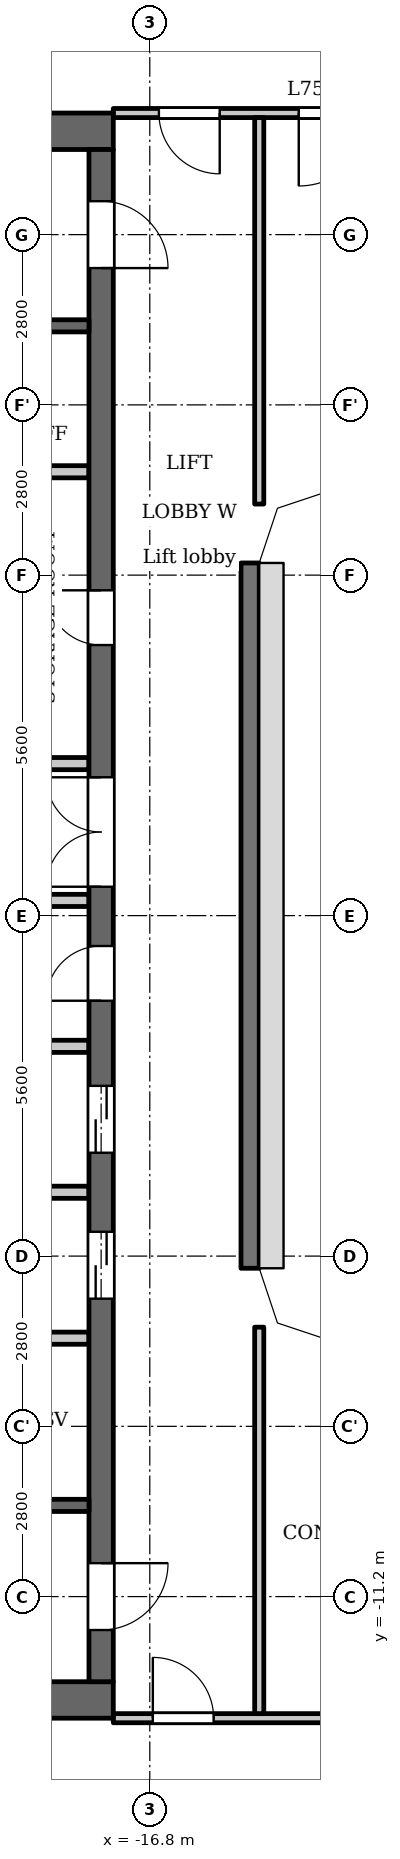
"""IFC4 building model, lengths in metres.
Left out: names, types, materials, properties, quantities, classifications, styles, units other than length and angle.
Written with IfcOpenShell. Run it as: python <this file> out.ifc"""

import sys

from ifc_helpers import new_model, si_unit, direction, frame, frame_2d, origin, place, context, subcontext, project, spatial, polyline, rectangle, outline, extrude, element, fill, save


model = new_model("IFC4")
c1 = context("Model", 3, precision=1e-05, world=origin(), true_north=direction((0.0, 1.0)))
c2 = subcontext(c1, "Body", "Model", "MODEL_VIEW")
j1 = project(units=[si_unit("LENGTHUNIT", "METRE"), si_unit("PLANEANGLEUNIT", "RADIAN")], contexts=[c1])
p1 = place(None, origin())
s1 = spatial("IfcSite", under=j1, at=p1, CompositionType="ELEMENT")
p2 = place(p1, origin())
s2 = spatial("IfcBuilding", under=s1, at=p2, CompositionType="ELEMENT")
p3 = place(p2, frame((0.0, 0.0, 289.1)))
s3 = spatial("IfcBuildingStorey", under=s2, at=p3, CompositionType="ELEMENT", Elevation=289.1)
p4 = place(p3, frame((-15.15, -5.8, 0.0), z_axis=(0.0, 0.0, 1.0), x_axis=(0.0, 1.0, 0.0)))
e1 = element("IfcWall", 1, at=p4, inside=s3, PredefinedType="SOLIDWALL", context=c2, shape_type="SweptSolid", body=[
    extrude(rectangle(XDim=11.6, YDim=0.3, at=frame_2d((5.8, 0.0))), origin(), (0.0, 0.0, 1.0), 5.0),
])
for number, where, z_axis, x_axis in (
    (2, (-17.4, 12.9, 0.0), (0.0, 0.0, 1.0), (-1.0, 0.0, 0.0)),
    (3, (-17.4, -12.9, 0.0), (0.0, 0.0, 1.0), (-1.0, 0.0, 0.0)),
):
    element("IfcWall", number, at=place(p3, frame(where, z_axis=z_axis, x_axis=x_axis)), inside=s3, PredefinedType="SHEAR", context=c2, shape_type="SweptSolid", body=[
        extrude(rectangle(XDim=7.32, YDim=0.6, at=frame_2d((3.66, 0.0))), origin(), (0.0, 0.0, 1.0), 5.0),
    ])
p5 = place(p3, frame((-17.6, -12.6, 0.0), z_axis=(0.0, 0.0, 1.0), x_axis=(0.0, 1.0, 0.0)))
e4 = element("IfcWall", 4, at=p5, inside=s3, PredefinedType="SHEAR", context=c2, shape_type="SweptSolid", body=[
    extrude(rectangle(XDim=25.2, YDim=0.4, at=frame_2d((12.6, 0.0))), origin(), (0.0, 0.0, 1.0), 5.0),
])
p6 = place(p5, frame((6.3, 0.0, 0.0)))
e5 = element("IfcOpeningElement", 5, at=p6, cuts=e4, PredefinedType="OPENING", context=c2, shape_type="SweptSolid", body=[
    extrude(rectangle(XDim=1.1, YDim=2.1, at=frame_2d((0.55, 1.05))), frame((0.0, 0.21, 0.0), z_axis=(0.0, -1.0, 0.0), x_axis=(1.0, 0.0, 0.0)), (0.0, 0.0, 1.0), 0.42),
])
p7 = place(p5, frame((8.7, 0.0, 0.0)))
e6 = element("IfcOpeningElement", 6, at=p7, cuts=e4, PredefinedType="OPENING", context=c2, shape_type="SweptSolid", body=[
    extrude(rectangle(XDim=1.1, YDim=2.1, at=frame_2d((0.55, 1.05))), frame((0.0, 0.21, 0.0), z_axis=(0.0, -1.0, 0.0), x_axis=(1.0, 0.0, 0.0)), (0.0, 0.0, 1.0), 0.42),
])
p8 = place(p5, frame((11.2, 0.0, 0.0)))
e7 = element("IfcOpeningElement", 7, at=p8, cuts=e4, PredefinedType="OPENING", context=c2, shape_type="SweptSolid", body=[
    extrude(rectangle(XDim=0.9, YDim=2.1, at=frame_2d((0.45, 1.05))), frame((0.0, 0.21, 0.0), z_axis=(0.0, -1.0, 0.0), x_axis=(1.0, 0.0, 0.0)), (0.0, 0.0, 1.0), 0.42),
])
p9 = place(p5, frame((17.05, 0.0, 0.0)))
e8 = element("IfcOpeningElement", 8, at=p9, cuts=e4, PredefinedType="OPENING", context=c2, shape_type="SweptSolid", body=[
    extrude(rectangle(XDim=0.9, YDim=2.1, at=frame_2d((0.45, 1.05))), frame((0.0, 0.21, 0.0), z_axis=(0.0, -1.0, 0.0), x_axis=(1.0, 0.0, 0.0)), (0.0, 0.0, 1.0), 0.42),
])
p10 = place(p5, frame((23.25, 0.0, 0.0)))
e9 = element("IfcOpeningElement", 9, at=p10, cuts=e4, PredefinedType="OPENING", context=c2, shape_type="SweptSolid", body=[
    extrude(rectangle(XDim=1.1, YDim=2.1, at=frame_2d((0.55, 1.05))), frame((0.0, 0.21, 0.0), z_axis=(0.0, -1.0, 0.0), x_axis=(1.0, 0.0, 0.0)), (0.0, 0.0, 1.0), 0.42),
])
p11 = place(p5, frame((0.85, 0.0, 0.0)))
e10 = element("IfcOpeningElement", 10, at=p11, cuts=e4, PredefinedType="OPENING", context=c2, shape_type="SweptSolid", body=[
    extrude(rectangle(XDim=1.1, YDim=2.1, at=frame_2d((0.55, 1.05))), frame((0.0, 0.21, 0.0), z_axis=(0.0, -1.0, 0.0), x_axis=(1.0, 0.0, 0.0)), (0.0, 0.0, 1.0), 0.42),
])
p12 = place(p5, frame((13.075, 0.0, 0.0)))
e11 = element("IfcOpeningElement", 11, at=p12, cuts=e4, PredefinedType="OPENING", context=c2, shape_type="SweptSolid", body=[
    extrude(rectangle(XDim=1.8, YDim=2.1, at=frame_2d((0.9, 1.05))), frame((0.0, 0.21, 0.0), z_axis=(0.0, -1.0, 0.0), x_axis=(1.0, 0.0, 0.0)), (0.0, 0.0, 1.0), 0.42),
])
p13 = place(p3, frame((-17.8, -9.7, 0.0), z_axis=(0.0, 0.0, 1.0), x_axis=(-1.0, 0.0, 0.0)))
e12 = element("IfcWall", 12, at=p13, inside=s3, PredefinedType="SHEAR", context=c2, shape_type="SweptSolid", body=[
    extrude(rectangle(XDim=5.8, YDim=0.2, at=frame_2d((2.9, 0.0))), origin(), (0.0, 0.0, 1.0), 5.0),
])
p14 = place(p13, frame((0.85, 0.0, 0.0)))
e13 = element("IfcOpeningElement", 13, at=p14, cuts=e12, PredefinedType="OPENING", context=c2, shape_type="SweptSolid", body=[
    extrude(rectangle(XDim=1.1, YDim=2.1, at=frame_2d((0.55, 1.05))), frame((0.0, 0.11, 0.0), z_axis=(0.0, -1.0, 0.0), x_axis=(1.0, 0.0, 0.0)), (0.0, 0.0, 1.0), 0.22),
])
p15 = place(p13, frame((3.75, 0.0, 0.0)))
e14 = element("IfcOpeningElement", 14, at=p15, cuts=e12, PredefinedType="OPENING", context=c2, shape_type="SweptSolid", body=[
    extrude(rectangle(XDim=1.1, YDim=2.1, at=frame_2d((0.55, 1.05))), frame((0.0, 0.11, 0.0), z_axis=(0.0, -1.0, 0.0), x_axis=(1.0, 0.0, 0.0)), (0.0, 0.0, 1.0), 0.22),
])
for number, where, z_axis, x_axis in (
    (15, (-17.8, -6.95, 0.0), (0.0, 0.0, 1.0), (-1.0, 0.0, 0.0)),
    (16, (-17.8, -4.55, 0.0), (0.0, 0.0, 1.0), (-1.0, 0.0, 0.0)),
    (17, (-17.8, -2.15, 0.0), (0.0, 0.0, 1.0), (-1.0, 0.0, 0.0)),
):
    element("IfcWall", number, at=place(p3, frame(where, z_axis=z_axis, x_axis=x_axis)), inside=s3, PredefinedType="PARTITIONING", context=c2, shape_type="SweptSolid", body=[
        extrude(rectangle(XDim=2.8, YDim=0.2, at=frame_2d((1.4, 0.0))), origin(), (0.0, 0.0, 1.0), 5.0),
    ])
p16 = place(p3, frame((-17.8, 0.25, 0.0), z_axis=(0.0, 0.0, 1.0), x_axis=(-1.0, 0.0, 0.0)))
e18 = element("IfcWall", 18, at=p16, inside=s3, PredefinedType="PARTITIONING", context=c2, shape_type="SweptSolid", body=[
    extrude(rectangle(XDim=3.0, YDim=0.2, at=frame_2d((1.5, 0.0))), origin(), (0.0, 0.0, 1.0), 5.0),
])
p17 = place(p3, frame((-17.8, 2.5, 0.0), z_axis=(0.0, 0.0, 1.0), x_axis=(-1.0, 0.0, 0.0)))
e19 = element("IfcWall", 19, at=p17, inside=s3, PredefinedType="PARTITIONING", context=c2, shape_type="SweptSolid", body=[
    extrude(rectangle(XDim=3.0, YDim=0.2, at=frame_2d((1.5, 0.0))), origin(), (0.0, 0.0, 1.0), 5.0),
])
p18 = place(p17, frame((1.7, 0.0, 0.0)))
e20 = element("IfcOpeningElement", 20, at=p18, cuts=e19, PredefinedType="OPENING", context=c2, shape_type="SweptSolid", body=[
    extrude(rectangle(XDim=0.9, YDim=2.1, at=frame_2d((0.45, 1.05))), frame((0.0, 0.11, 0.0), z_axis=(0.0, -1.0, 0.0), x_axis=(1.0, 0.0, 0.0)), (0.0, 0.0, 1.0), 0.22),
])
p19 = place(p3, frame((-17.8, 7.3, 0.0), z_axis=(0.0, 0.0, 1.0), x_axis=(-1.0, 0.0, 0.0)))
e21 = element("IfcWall", 21, at=p19, inside=s3, PredefinedType="PARTITIONING", context=c2, shape_type="SweptSolid", body=[
    extrude(rectangle(XDim=2.8, YDim=0.2, at=frame_2d((1.4, 0.0))), origin(), (0.0, 0.0, 1.0), 5.0),
])
p20 = place(p3, frame((-17.8, 9.7, 0.0), z_axis=(0.0, 0.0, 1.0), x_axis=(-1.0, 0.0, 0.0)))
e22 = element("IfcWall", 22, at=p20, inside=s3, PredefinedType="SHEAR", context=c2, shape_type="SweptSolid", body=[
    extrude(rectangle(XDim=5.8, YDim=0.2, at=frame_2d((2.9, 0.0))), origin(), (0.0, 0.0, 1.0), 5.0),
])
p21 = place(p20, frame((0.85, 0.0, 0.0)))
e23 = element("IfcOpeningElement", 23, at=p21, cuts=e22, PredefinedType="OPENING", context=c2, shape_type="SweptSolid", body=[
    extrude(rectangle(XDim=1.1, YDim=2.1, at=frame_2d((0.55, 1.05))), frame((0.0, 0.11, 0.0), z_axis=(0.0, -1.0, 0.0), x_axis=(1.0, 0.0, 0.0)), (0.0, 0.0, 1.0), 0.22),
])
p22 = place(p20, frame((3.75, 0.0, 0.0)))
e24 = element("IfcOpeningElement", 24, at=p22, cuts=e22, PredefinedType="OPENING", context=c2, shape_type="SweptSolid", body=[
    extrude(rectangle(XDim=1.1, YDim=2.1, at=frame_2d((0.55, 1.05))), frame((0.0, 0.11, 0.0), z_axis=(0.0, -1.0, 0.0), x_axis=(1.0, 0.0, 0.0)), (0.0, 0.0, 1.0), 0.22),
])
p23 = place(p3, frame((-17.4, -13.2, 0.0), z_axis=(0.0, 0.0, 1.0), x_axis=(1.0, 0.0, 0.0)))
e25 = element("IfcWall", 25, at=p23, inside=s3, PredefinedType="PARTITIONING", context=c2, shape_type="SweptSolid", body=[
    extrude(rectangle(XDim=34.8, YDim=0.15, at=frame_2d((17.4, 0.0))), origin(), (0.0, 0.0, 1.0), 5.0),
])
p24 = place(p23, frame((0.65, 0.0, 0.0)))
e26 = element("IfcOpeningElement", 26, at=p24, cuts=e25, PredefinedType="OPENING", context=c2, shape_type="SweptSolid", body=[
    extrude(rectangle(XDim=1.0, YDim=2.1, at=frame_2d((0.5, 1.05))), frame((0.0, 0.085, 0.0), z_axis=(0.0, -1.0, 0.0), x_axis=(1.0, 0.0, 0.0)), (0.0, 0.0, 1.0), 0.17),
])
p25 = place(p23, frame((33.05, 0.0, 0.0)))
e27 = element("IfcOpeningElement", 27, at=p25, cuts=e25, PredefinedType="OPENING", context=c2, shape_type="SweptSolid", body=[
    extrude(rectangle(XDim=1.0, YDim=2.1, at=frame_2d((0.5, 1.05))), frame((0.0, 0.085, 0.0), z_axis=(0.0, -1.0, 0.0), x_axis=(1.0, 0.0, 0.0)), (0.0, 0.0, 1.0), 0.17),
])
p26 = place(p23, frame((6.75, 0.0, 0.0)))
e28 = element("IfcOpeningElement", 28, at=p26, cuts=e25, PredefinedType="OPENING", context=c2, shape_type="SweptSolid", body=[
    extrude(rectangle(XDim=1.0, YDim=2.1, at=frame_2d((0.5, 1.05))), frame((0.0, 0.085, 0.0), z_axis=(0.0, -1.0, 0.0), x_axis=(1.0, 0.0, 0.0)), (0.0, 0.0, 1.0), 0.17),
])
p27 = place(p23, frame((9.0, 0.0, 0.0)))
e29 = element("IfcOpeningElement", 29, at=p27, cuts=e25, PredefinedType="OPENING", context=c2, shape_type="SweptSolid", body=[
    extrude(rectangle(XDim=1.0, YDim=2.1, at=frame_2d((0.5, 1.05))), frame((0.0, 0.085, 0.0), z_axis=(0.0, -1.0, 0.0), x_axis=(1.0, 0.0, 0.0)), (0.0, 0.0, 1.0), 0.17),
])
p28 = place(p23, frame((30.55, 0.0, 0.0)))
e30 = element("IfcOpeningElement", 30, at=p28, cuts=e25, PredefinedType="OPENING", context=c2, shape_type="SweptSolid", body=[
    extrude(rectangle(XDim=1.2, YDim=2.1, at=frame_2d((0.6, 1.05))), frame((0.0, 0.085, 0.0), z_axis=(0.0, -1.0, 0.0), x_axis=(1.0, 0.0, 0.0)), (0.0, 0.0, 1.0), 0.17),
])
p29 = place(p3, frame((-17.4, 13.2, 0.0), z_axis=(0.0, 0.0, 1.0), x_axis=(1.0, 0.0, 0.0)))
e31 = element("IfcWall", 31, at=p29, inside=s3, PredefinedType="PARTITIONING", context=c2, shape_type="SweptSolid", body=[
    extrude(rectangle(XDim=34.8, YDim=0.15, at=frame_2d((17.4, 0.0))), origin(), (0.0, 0.0, 1.0), 5.0),
])
p30 = place(p29, frame((0.75, 0.0, 0.0)))
e32 = element("IfcOpeningElement", 32, at=p30, cuts=e31, PredefinedType="OPENING", context=c2, shape_type="SweptSolid", body=[
    extrude(rectangle(XDim=1.0, YDim=2.1, at=frame_2d((0.5, 1.05))), frame((0.0, 0.085, 0.0), z_axis=(0.0, -1.0, 0.0), x_axis=(1.0, 0.0, 0.0)), (0.0, 0.0, 1.0), 0.17),
])
p31 = place(p29, frame((33.15, 0.0, 0.0)))
e33 = element("IfcOpeningElement", 33, at=p31, cuts=e31, PredefinedType="OPENING", context=c2, shape_type="SweptSolid", body=[
    extrude(rectangle(XDim=1.0, YDim=2.1, at=frame_2d((0.5, 1.05))), frame((0.0, 0.085, 0.0), z_axis=(0.0, -1.0, 0.0), x_axis=(1.0, 0.0, 0.0)), (0.0, 0.0, 1.0), 0.17),
])
p32 = place(p29, frame((3.05, 0.0, 0.0)))
e34 = element("IfcOpeningElement", 34, at=p32, cuts=e31, PredefinedType="OPENING", context=c2, shape_type="SweptSolid", body=[
    extrude(rectangle(XDim=1.2, YDim=2.1, at=frame_2d((0.6, 1.05))), frame((0.0, 0.085, 0.0), z_axis=(0.0, -1.0, 0.0), x_axis=(1.0, 0.0, 0.0)), (0.0, 0.0, 1.0), 0.17),
])
p33 = place(p29, frame((30.8, 0.0, 0.0)))
e35 = element("IfcOpeningElement", 35, at=p33, cuts=e31, PredefinedType="OPENING", context=c2, shape_type="SweptSolid", body=[
    extrude(rectangle(XDim=1.0, YDim=2.1, at=frame_2d((0.5, 1.05))), frame((0.0, 0.085, 0.0), z_axis=(0.0, -1.0, 0.0), x_axis=(1.0, 0.0, 0.0)), (0.0, 0.0, 1.0), 0.17),
])
for number, where, z_axis, x_axis in (
    (36, (-15.0, -13.125, 0.0), (0.0, 0.0, 1.0), (0.0, 1.0, 0.0)),
    (37, (-15.0, 6.769, 0.0), (0.0, 0.0, 1.0), (0.0, 1.0, 0.0)),
):
    element("IfcWall", number, at=place(p3, frame(where, z_axis=z_axis, x_axis=x_axis)), inside=s3, PredefinedType="PARTITIONING", context=c2, shape_type="SweptSolid", body=[
        extrude(rectangle(XDim=6.356, YDim=0.15, at=frame_2d((3.178, 0.0))), origin(), (0.0, 0.0, 1.0), 5.0),
    ])
p34 = place(p3, origin())
e38 = element("IfcWall", 38, at=p34, inside=s3, PredefinedType="SOLIDWALL", context=c2, shape_type="SweptSolid", body=[
    extrude(outline(polyline([(-13.849, 7.3), (-14.937, 6.937), (-15.3, 5.849), (-15.3, 5.8), (-15.0, 5.8), (-14.7, 6.7), (-13.8, 7.0), (-13.8, 7.3), (-13.849, 7.3)])), origin(), (0.0, 0.0, 1.0), 5.0),
])
e39 = element("IfcWall", 39, at=p34, inside=s3, PredefinedType="SOLIDWALL", context=c2, shape_type="SweptSolid", body=[
    extrude(outline(polyline([(-14.937, -6.937), (-13.849, -7.3), (-13.8, -7.3), (-13.8, -7.0), (-14.7, -6.7), (-15.0, -5.8), (-15.3, -5.8), (-15.3, -5.849), (-14.937, -6.937)])), origin(), (0.0, 0.0, 1.0), 5.0),
])
p35 = place(p6, origin())
e40 = element("IfcDoor", 40, at=p35, inside=s3, OperationType="DOUBLE_DOOR_SLIDING", PredefinedType="DOOR", context=c2, shape_type="SweptSolid", body=[
    extrude(rectangle(XDim=1.1, YDim=2.1, at=frame_2d((0.55, 1.05))), frame((0.0, 0.025, 0.0), z_axis=(0.0, -1.0, 0.0), x_axis=(1.0, 0.0, 0.0)), (0.0, 0.0, 1.0), 0.05),
])
fill(e5, e40)
p36 = place(p7, origin())
e41 = element("IfcDoor", 41, at=p36, inside=s3, OperationType="DOUBLE_DOOR_SLIDING", PredefinedType="DOOR", context=c2, shape_type="SweptSolid", body=[
    extrude(rectangle(XDim=1.1, YDim=2.1, at=frame_2d((0.55, 1.05))), frame((0.0, 0.025, 0.0), z_axis=(0.0, -1.0, 0.0), x_axis=(1.0, 0.0, 0.0)), (0.0, 0.0, 1.0), 0.05),
])
fill(e6, e41)
p37 = place(p8, origin())
e42 = element("IfcDoor", 42, at=p37, inside=s3, OperationType="SINGLE_SWING_RIGHT", PredefinedType="DOOR", context=c2, shape_type="SweptSolid", body=[
    extrude(rectangle(XDim=0.9, YDim=2.1, at=frame_2d((0.45, 1.05))), frame((0.0, 0.025, 0.0), z_axis=(0.0, -1.0, 0.0), x_axis=(1.0, 0.0, 0.0)), (0.0, 0.0, 1.0), 0.05),
])
fill(e7, e42)
p38 = place(p9, origin())
e43 = element("IfcDoor", 43, at=p38, inside=s3, OperationType="SINGLE_SWING_LEFT", PredefinedType="DOOR", context=c2, shape_type="SweptSolid", body=[
    extrude(rectangle(XDim=0.9, YDim=2.1, at=frame_2d((0.45, 1.05))), frame((0.0, 0.025, 0.0), z_axis=(0.0, -1.0, 0.0), x_axis=(1.0, 0.0, 0.0)), (0.0, 0.0, 1.0), 0.05),
])
fill(e8, e43)
p39 = place(p10, origin())
e44 = element("IfcDoor", 44, at=p39, inside=s3, OperationType="SINGLE_SWING_LEFT", PredefinedType="DOOR", context=c2, shape_type="SweptSolid", body=[
    extrude(rectangle(XDim=1.1, YDim=2.1, at=frame_2d((0.55, 1.05))), frame((0.0, 0.025, 0.0), z_axis=(0.0, -1.0, 0.0), x_axis=(1.0, 0.0, 0.0)), (0.0, 0.0, 1.0), 0.05),
])
fill(e9, e44)
p40 = place(p11, origin())
e45 = element("IfcDoor", 45, at=p40, inside=s3, OperationType="SINGLE_SWING_RIGHT", PredefinedType="DOOR", context=c2, shape_type="SweptSolid", body=[
    extrude(rectangle(XDim=1.1, YDim=2.1, at=frame_2d((0.55, 1.05))), frame((0.0, 0.025, 0.0), z_axis=(0.0, -1.0, 0.0), x_axis=(1.0, 0.0, 0.0)), (0.0, 0.0, 1.0), 0.05),
])
fill(e10, e45)
p41 = place(p12, origin())
e46 = element("IfcDoor", 46, at=p41, inside=s3, OperationType="DOUBLE_DOOR_SINGLE_SWING", PredefinedType="DOOR", context=c2, shape_type="SweptSolid", body=[
    extrude(rectangle(XDim=1.8, YDim=2.1, at=frame_2d((0.9, 1.05))), frame((0.0, 0.025, 0.0), z_axis=(0.0, -1.0, 0.0), x_axis=(1.0, 0.0, 0.0)), (0.0, 0.0, 1.0), 0.05),
])
fill(e11, e46)
p42 = place(p30, origin())
e47 = element("IfcDoor", 47, at=p42, inside=s3, OperationType="SINGLE_SWING_RIGHT", PredefinedType="DOOR", context=c2, shape_type="SweptSolid", body=[
    extrude(rectangle(XDim=1.0, YDim=2.1, at=frame_2d((0.5, 1.05))), frame((0.0, 0.025, 0.0), z_axis=(0.0, -1.0, 0.0), x_axis=(1.0, 0.0, 0.0)), (0.0, 0.0, 1.0), 0.05),
])
fill(e32, e47)
p43 = place(p32, origin())
e48 = element("IfcDoor", 48, at=p43, inside=s3, OperationType="SINGLE_SWING_LEFT", PredefinedType="DOOR", context=c2, shape_type="SweptSolid", body=[
    extrude(rectangle(XDim=1.2, YDim=2.1, at=frame_2d((0.6, 1.05))), frame((0.0, 0.025, 0.0), z_axis=(0.0, -1.0, 0.0), x_axis=(1.0, 0.0, 0.0)), (0.0, 0.0, 1.0), 0.05),
])
fill(e34, e48)
p44 = place(p24, origin())
e49 = element("IfcDoor", 49, at=p44, inside=s3, OperationType="SINGLE_SWING_RIGHT", PredefinedType="DOOR", context=c2, shape_type="SweptSolid", body=[
    extrude(rectangle(XDim=1.0, YDim=2.1, at=frame_2d((0.5, 1.05))), frame((0.0, 0.025, 0.0), z_axis=(0.0, -1.0, 0.0), x_axis=(1.0, 0.0, 0.0)), (0.0, 0.0, 1.0), 0.05),
])
fill(e26, e49)
save(model, sys.argv[1])
